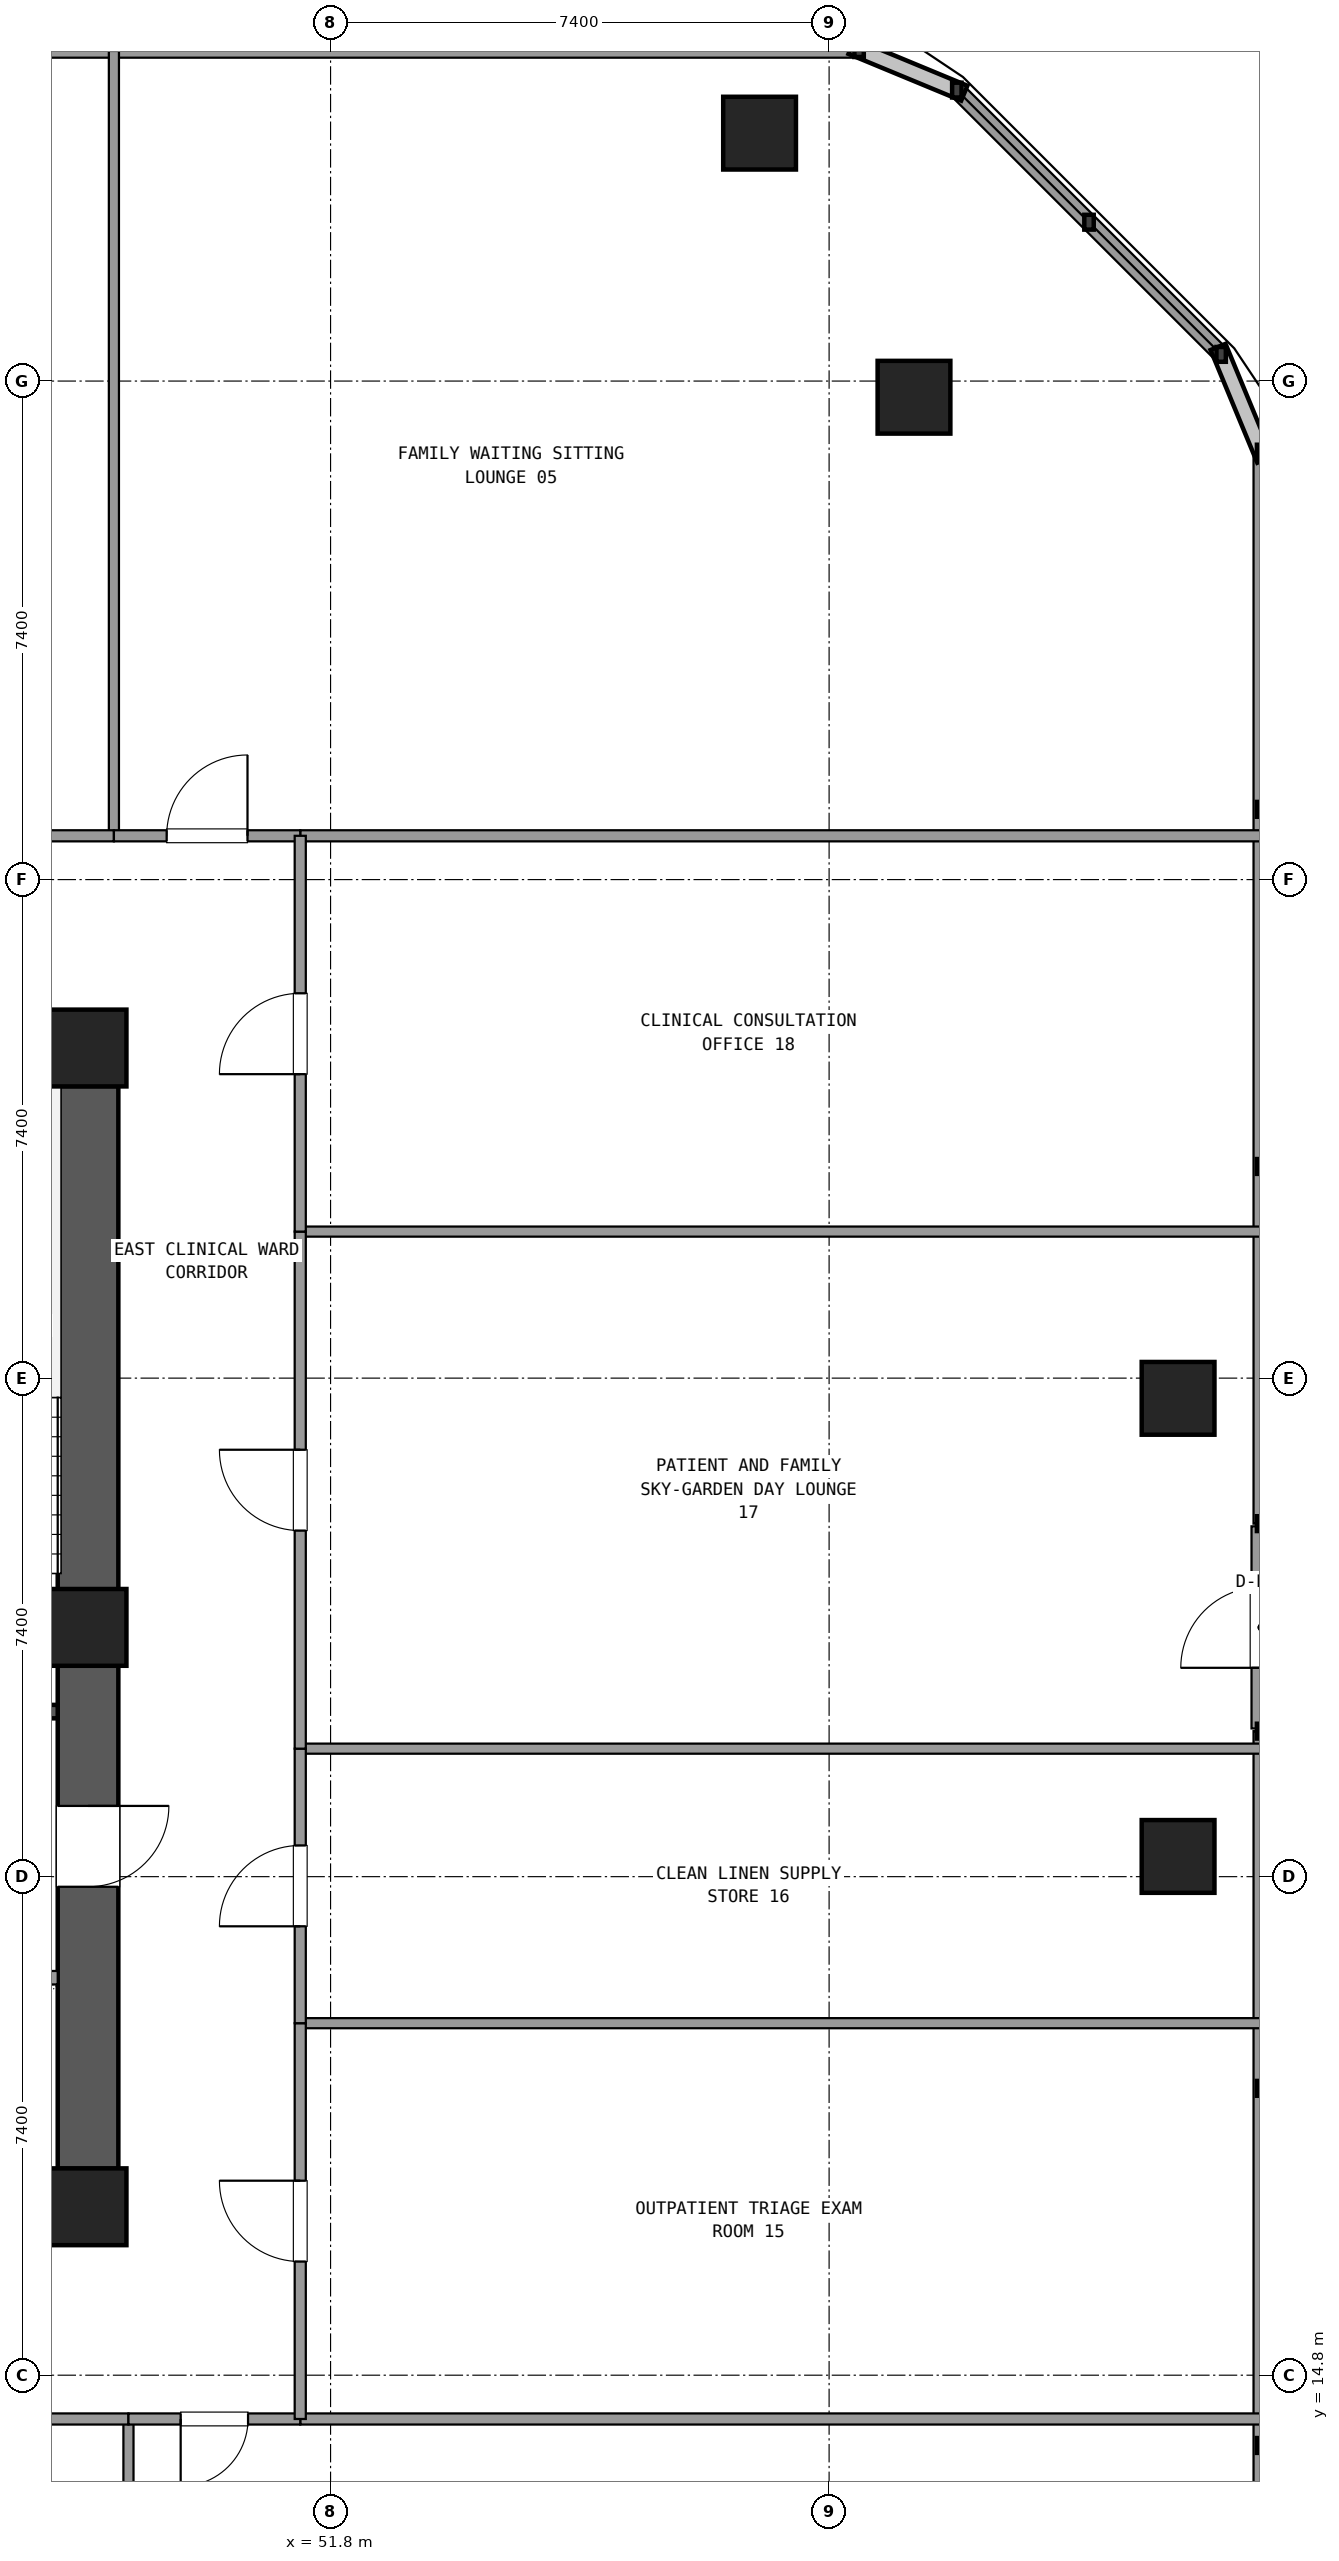
"""IFC4 building model, lengths in metres.
Left out: names, types, materials, properties, quantities, classifications, styles, units other than length and angle.
Written with IfcOpenShell. Run it as: python <this file> out.ifc"""

import sys

from ifc_helpers import new_model, si_unit, direction, frame, frame_2d, origin, origin_2d, place, context, subcontext, project, spatial, rectangle, extrude, element, fill, save


model = new_model("IFC4")
c1 = context("Model", 3, precision=1e-05, world=origin(), true_north=direction((0.0, 1.0)))
c2 = subcontext(c1, "Body", "Model", "MODEL_VIEW")
j1 = project(units=[si_unit("LENGTHUNIT", "METRE"), si_unit("PLANEANGLEUNIT", "RADIAN")], contexts=[c1])
p1 = place(None, origin())
s1 = spatial("IfcSite", under=j1, at=p1, CompositionType="ELEMENT")
p2 = place(p1, origin())
s2 = spatial("IfcBuilding", under=s1, at=p2, CompositionType="ELEMENT")
p3 = place(p2, frame((0.0, 0.0, 41.94)))
s3 = spatial("IfcBuildingStorey", under=s2, at=p3, CompositionType="ELEMENT", Elevation=41.94)
for number, where, z_axis, x_axis in (
    (1, (48.2, 17.3, 0.0), (0.0, 0.0, 1.0), (1.0, 0.0, 0.0)),
    (2, (48.2, 25.9, 0.0), (0.0, 0.0, 1.0), (1.0, 0.0, 0.0)),
    (3, (48.2, 34.5, 0.0), (0.0, 0.0, 1.0), (1.0, 0.0, 0.0)),
):
    element("IfcColumn", number, at=place(p3, frame(where, z_axis=z_axis, x_axis=x_axis)), inside=s3, PredefinedType="COLUMN", context=c2, shape_type="SweptSolid", body=[
        extrude(rectangle(XDim=1.14, YDim=1.14, at=origin_2d()), origin(), (0.0, 0.0, 1.0), 3.6),
    ])
p4 = place(p3, frame((48.2, 17.865, 0.0), z_axis=(0.0, 0.0, 1.0), x_axis=(0.0, 1.0, 0.0)))
e4 = element("IfcWall", 4, at=p4, inside=s3, PredefinedType="SHEAR", context=c2, shape_type="SweptSolid", body=[
    extrude(rectangle(XDim=7.47, YDim=0.9, at=frame_2d((3.735, 0.0))), origin(), (0.0, 0.0, 1.0), 3.32),
])
p5 = place(p4, frame((4.185, 0.0, 0.0)))
e5 = element("IfcOpeningElement", 5, at=p5, cuts=e4, PredefinedType="OPENING", context=c2, shape_type="SweptSolid", body=[
    extrude(rectangle(XDim=1.2, YDim=2.15, at=frame_2d((0.6, 1.075))), frame((0.0, 0.46, 0.0), z_axis=(0.0, -1.0, 0.0), x_axis=(1.0, 0.0, 0.0)), (0.0, 0.0, 1.0), 0.92),
])
p6 = place(p3, frame((48.2, 26.465, 0.0), z_axis=(0.0, 0.0, 1.0), x_axis=(0.0, 1.0, 0.0)))
e6 = element("IfcWall", 6, at=p6, inside=s3, PredefinedType="SHEAR", context=c2, shape_type="SweptSolid", body=[
    extrude(rectangle(XDim=7.47, YDim=0.9, at=frame_2d((3.735, 0.0))), origin(), (0.0, 0.0, 1.0), 3.32),
])
for number, where, z_axis, x_axis in (
    (7, (64.38, 22.5, 0.0), (0.0, 0.0, 1.0), (1.0, 0.0, 0.0)),
    (8, (64.38, 29.3, 0.0), (0.0, 0.0, 1.0), (1.0, 0.0, 0.0)),
    (9, (60.46, 44.16, 0.0), (0.0, 0.0, 1.0), (1.0, 0.0, 0.0)),
    (10, (58.168, 48.08, 0.0), (0.0, 0.0, 1.0), (1.0, 0.0, 0.0)),
):
    element("IfcColumn", number, at=place(p3, frame(where, z_axis=z_axis, x_axis=x_axis)), inside=s3, PredefinedType="COLUMN", context=c2, shape_type="SweptSolid", body=[
        extrude(rectangle(XDim=1.08, YDim=1.08, at=origin_2d()), origin(), (0.0, 0.0, 1.0), 3.6),
    ])
p7 = place(p3, frame((65.62, 24.4, 0.0), z_axis=(0.0, 0.0, 1.0), x_axis=(0.0, 1.0, 0.0)))
e11 = element("IfcWall", 11, at=p7, inside=s3, PredefinedType="SOLIDWALL", context=c2, shape_type="SweptSolid", body=[
    extrude(rectangle(XDim=3.0, YDim=0.3, at=frame_2d((1.5, 0.0))), origin(), (0.0, 0.0, 1.0), 2.65),
])
p8 = place(p7, frame((0.9, 0.0, 0.0)))
e12 = element("IfcOpeningElement", 12, at=p8, cuts=e11, PredefinedType="OPENING", context=c2, shape_type="SweptSolid", body=[
    extrude(rectangle(XDim=1.2, YDim=2.2, at=frame_2d((0.6, 1.1))), frame((0.0, 0.16, 0.0), z_axis=(0.0, -1.0, 0.0), x_axis=(1.0, 0.0, 0.0)), (0.0, 0.0, 1.0), 0.32),
])
for number, where, z_axis, x_axis in (
    (13, (65.62, 8.455, 0.0), (0.0, 0.0, 1.0), (0.0, 1.0, 0.0)),
    (14, (65.62, 27.44, 0.0), (0.0, 0.0, 1.0), (0.0, 1.0, 0.0)),
):
    element("IfcWall", number, at=place(p3, frame(where, z_axis=z_axis, x_axis=x_axis)), inside=s3, PredefinedType="SOLIDWALL", context=c2, shape_type="SweptSolid", body=[
        extrude(rectangle(XDim=15.905, YDim=0.24, at=frame_2d((7.953, 0.0))), origin(), (0.0, 0.0, 1.0), 0.85),
    ])
p9 = place(p3, frame((65.019, 44.796, 0.0), z_axis=(0.0, 0.0, 1.0), x_axis=(-0.707106781187, 0.707106781187, 0.0)))
e15 = element("IfcWall", 15, at=p9, inside=s3, PredefinedType="SOLIDWALL", context=c2, shape_type="SweptSolid", body=[
    extrude(rectangle(XDim=5.548, YDim=0.24, at=frame_2d((2.774, 0.0))), origin(), (0.0, 0.0, 1.0), 0.85),
])
p10 = place(p3, frame((59.645, 49.32, 0.0), z_axis=(0.0, 0.0, 1.0), x_axis=(-1.0, 0.0, 0.0)))
e16 = element("IfcWall", 16, at=p10, inside=s3, PredefinedType="SOLIDWALL", context=c2, shape_type="SweptSolid", body=[
    extrude(rectangle(XDim=45.29, YDim=0.24, at=frame_2d((22.645, 0.0))), origin(), (0.0, 0.0, 1.0), 0.85),
])
p11 = place(p3, frame((43.35, 24.65, 0.0), z_axis=(0.0, 0.0, 1.0), x_axis=(1.0, 0.0, 0.0)))
e17 = element("IfcWall", 17, at=p11, inside=s3, PredefinedType="SHEAR", context=c2, shape_type="SweptSolid", body=[
    extrude(rectangle(XDim=4.4, YDim=0.2, at=frame_2d((2.2, 0.0))), origin(), (0.0, 0.0, 1.0), 3.32),
])
p12 = place(p11, frame((2.0, 0.0, 0.0)))
e18 = element("IfcOpeningElement", 18, at=p12, cuts=e17, PredefinedType="OPENING", context=c2, shape_type="SweptSolid", body=[
    extrude(rectangle(XDim=1.2, YDim=2.15, at=frame_2d((0.6, 1.075))), frame((0.0, 0.11, 0.0), z_axis=(0.0, -1.0, 0.0), x_axis=(1.0, 0.0, 0.0)), (0.0, 0.0, 1.0), 0.22),
])
p13 = place(p3, frame((43.35, 20.7, 0.0), z_axis=(0.0, 0.0, 1.0), x_axis=(1.0, 0.0, 0.0)))
e19 = element("IfcWall", 19, at=p13, inside=s3, PredefinedType="SOLIDWALL", context=c2, shape_type="SweptSolid", body=[
    extrude(rectangle(XDim=4.4, YDim=0.2, at=frame_2d((2.2, 0.0))), origin(), (0.0, 0.0, 1.0), 2.61),
])
p14 = place(p13, frame((2.35, 0.0, 0.0)))
e20 = element("IfcOpeningElement", 20, at=p14, cuts=e19, PredefinedType="OPENING", context=c2, shape_type="SweptSolid", body=[
    extrude(rectangle(XDim=1.2, YDim=2.15, at=frame_2d((0.6, 1.075))), frame((0.0, 0.11, 0.0), z_axis=(0.0, -1.0, 0.0), x_axis=(1.0, 0.0, 0.0)), (0.0, 0.0, 1.0), 0.22),
])
for number, where, z_axis, x_axis in (
    (21, (51.35, 37.65, 0.0), (0.0, 0.0, 1.0), (1.0, 0.0, 0.0)),
    (22, (51.35, 14.15, 0.0), (0.0, 0.0, 1.0), (1.0, 0.0, 0.0)),
):
    element("IfcWall", number, at=place(p3, frame(where, z_axis=z_axis, x_axis=x_axis)), inside=s3, PredefinedType="PARTITIONING", context=c2, shape_type="SweptSolid", body=[
        extrude(rectangle(XDim=14.25, YDim=0.165, at=frame_2d((7.125, 0.0))), origin(), (0.0, 0.0, 1.0), 2.61),
    ])
p15 = place(p3, frame((48.584, 37.65, 0.0), z_axis=(0.0, 0.0, 1.0), x_axis=(0.0, 1.0, 0.0)))
e23 = element("IfcWall", 23, at=p15, inside=s3, PredefinedType="PARTITIONING", context=c2, shape_type="SweptSolid", body=[
    extrude(rectangle(XDim=11.65, YDim=0.15, at=frame_2d((5.825, 0.0))), origin(), (0.0, 0.0, 1.0), 2.61),
])
p16 = place(p3, frame((41.099, 37.65, 0.0), z_axis=(0.0, 0.0, 1.0), x_axis=(1.0, 0.0, 0.0)))
e24 = element("IfcWall", 24, at=p16, inside=s3, PredefinedType="PARTITIONING", context=c2, shape_type="SweptSolid", body=[
    extrude(rectangle(XDim=7.485, YDim=0.165, at=frame_2d((3.742, 0.0))), origin(), (0.0, 0.0, 1.0), 2.61),
])
p17 = place(p16, frame((3.143, 0.0, 0.0)))
e25 = element("IfcOpeningElement", 25, at=p17, cuts=e24, PredefinedType="OPENING", context=c2, shape_type="SweptSolid", body=[
    extrude(rectangle(XDim=1.2, YDim=2.15, at=frame_2d((0.6, 1.075))), frame((0.0, 0.093, 0.0), z_axis=(0.0, -1.0, 0.0), x_axis=(1.0, 0.0, 0.0)), (0.0, 0.0, 1.0), 0.185),
])
p18 = place(p3, frame((48.584, 37.65, 0.0), z_axis=(0.0, 0.0, 1.0), x_axis=(1.0, 0.0, 0.0)))
e26 = element("IfcWall", 26, at=p18, inside=s3, PredefinedType="PARTITIONING", context=c2, shape_type="SweptSolid", body=[
    extrude(rectangle(XDim=2.766, YDim=0.165, at=frame_2d((1.383, 0.0))), origin(), (0.0, 0.0, 1.0), 2.61),
])
p19 = place(p18, frame((0.783, 0.0, 0.0)))
e27 = element("IfcOpeningElement", 27, at=p19, cuts=e26, PredefinedType="OPENING", context=c2, shape_type="SweptSolid", body=[
    extrude(rectangle(XDim=1.2, YDim=2.15, at=frame_2d((0.6, 1.075))), frame((0.0, 0.093, 0.0), z_axis=(0.0, -1.0, 0.0), x_axis=(1.0, 0.0, 0.0)), (0.0, 0.0, 1.0), 0.185),
])
p20 = place(p3, frame((48.8, 14.15, 0.0), z_axis=(0.0, 0.0, 1.0), x_axis=(0.0, -1.0, 0.0)))
e28 = element("IfcWall", 28, at=p20, inside=s3, PredefinedType="PARTITIONING", context=c2, shape_type="SweptSolid", body=[
    extrude(rectangle(XDim=11.65, YDim=0.15, at=frame_2d((5.825, 0.0))), origin(), (0.0, 0.0, 1.0), 2.61),
])
p21 = place(p3, frame((41.964, 14.15, 0.0), z_axis=(0.0, 0.0, 1.0), x_axis=(1.0, 0.0, 0.0)))
e29 = element("IfcWall", 29, at=p21, inside=s3, PredefinedType="PARTITIONING", context=c2, shape_type="SweptSolid", body=[
    extrude(rectangle(XDim=6.836, YDim=0.165, at=frame_2d((3.418, 0.0))), origin(), (0.0, 0.0, 1.0), 2.61),
])
p22 = place(p21, frame((2.818, 0.0, 0.0)))
e30 = element("IfcOpeningElement", 30, at=p22, cuts=e29, PredefinedType="OPENING", context=c2, shape_type="SweptSolid", body=[
    extrude(rectangle(XDim=1.2, YDim=2.15, at=frame_2d((0.6, 1.075))), frame((0.0, 0.093, 0.0), z_axis=(0.0, -1.0, 0.0), x_axis=(1.0, 0.0, 0.0)), (0.0, 0.0, 1.0), 0.185),
])
p23 = place(p3, frame((48.8, 14.15, 0.0), z_axis=(0.0, 0.0, 1.0), x_axis=(1.0, 0.0, 0.0)))
e31 = element("IfcWall", 31, at=p23, inside=s3, PredefinedType="PARTITIONING", context=c2, shape_type="SweptSolid", body=[
    extrude(rectangle(XDim=2.55, YDim=0.165, at=frame_2d((1.275, 0.0))), origin(), (0.0, 0.0, 1.0), 2.61),
])
p24 = place(p23, frame((0.775, 0.0, 0.0)))
e32 = element("IfcOpeningElement", 32, at=p24, cuts=e31, PredefinedType="OPENING", context=c2, shape_type="SweptSolid", body=[
    extrude(rectangle(XDim=1.0, YDim=2.15, at=frame_2d((0.5, 1.075))), frame((0.0, 0.093, 0.0), z_axis=(0.0, -1.0, 0.0), x_axis=(1.0, 0.0, 0.0)), (0.0, 0.0, 1.0), 0.185),
])
p25 = place(p3, frame((51.35, 20.025, 0.0), z_axis=(0.0, 0.0, 1.0), x_axis=(1.0, 0.0, 0.0)))
e33 = element("IfcWall", 33, at=p25, inside=s3, PredefinedType="PARTITIONING", context=c2, shape_type="SweptSolid", body=[
    extrude(rectangle(XDim=14.25, YDim=0.15, at=frame_2d((7.125, 0.0))), origin(), (0.0, 0.0, 1.0), 2.61),
])
p26 = place(p3, frame((51.35, 14.15, 0.0), z_axis=(0.0, 0.0, 1.0), x_axis=(0.0, 1.0, 0.0)))
e34 = element("IfcWall", 34, at=p26, inside=s3, PredefinedType="PARTITIONING", context=c2, shape_type="SweptSolid", body=[
    extrude(rectangle(XDim=5.875, YDim=0.165, at=frame_2d((2.938, 0.0))), origin(), (0.0, 0.0, 1.0), 2.61),
])
p27 = place(p26, frame((2.337, 0.0, 0.0)))
e35 = element("IfcOpeningElement", 35, at=p27, cuts=e34, PredefinedType="OPENING", context=c2, shape_type="SweptSolid", body=[
    extrude(rectangle(XDim=1.2, YDim=2.15, at=frame_2d((0.6, 1.075))), frame((0.0, 0.093, 0.0), z_axis=(0.0, -1.0, 0.0), x_axis=(1.0, 0.0, 0.0)), (0.0, 0.0, 1.0), 0.185),
])
p28 = place(p3, frame((51.35, 24.1, 0.0), z_axis=(0.0, 0.0, 1.0), x_axis=(1.0, 0.0, 0.0)))
e36 = element("IfcWall", 36, at=p28, inside=s3, PredefinedType="PARTITIONING", context=c2, shape_type="SweptSolid", body=[
    extrude(rectangle(XDim=14.25, YDim=0.15, at=frame_2d((7.125, 0.0))), origin(), (0.0, 0.0, 1.0), 2.61),
])
p29 = place(p3, frame((51.35, 20.025, 0.0), z_axis=(0.0, 0.0, 1.0), x_axis=(0.0, 1.0, 0.0)))
e37 = element("IfcWall", 37, at=p29, inside=s3, PredefinedType="PARTITIONING", context=c2, shape_type="SweptSolid", body=[
    extrude(rectangle(XDim=4.075, YDim=0.165, at=frame_2d((2.038, 0.0))), origin(), (0.0, 0.0, 1.0), 2.61),
])
p30 = place(p29, frame((1.438, 0.0, 0.0)))
e38 = element("IfcOpeningElement", 38, at=p30, cuts=e37, PredefinedType="OPENING", context=c2, shape_type="SweptSolid", body=[
    extrude(rectangle(XDim=1.2, YDim=2.15, at=frame_2d((0.6, 1.075))), frame((0.0, 0.093, 0.0), z_axis=(0.0, -1.0, 0.0), x_axis=(1.0, 0.0, 0.0)), (0.0, 0.0, 1.0), 0.185),
])
p31 = place(p3, frame((51.35, 31.775, 0.0), z_axis=(0.0, 0.0, 1.0), x_axis=(1.0, 0.0, 0.0)))
e39 = element("IfcWall", 39, at=p31, inside=s3, PredefinedType="PARTITIONING", context=c2, shape_type="SweptSolid", body=[
    extrude(rectangle(XDim=14.25, YDim=0.15, at=frame_2d((7.125, 0.0))), origin(), (0.0, 0.0, 1.0), 2.61),
])
p32 = place(p3, frame((51.35, 24.1, 0.0), z_axis=(0.0, 0.0, 1.0), x_axis=(0.0, 1.0, 0.0)))
e40 = element("IfcWall", 40, at=p32, inside=s3, PredefinedType="PARTITIONING", context=c2, shape_type="SweptSolid", body=[
    extrude(rectangle(XDim=7.675, YDim=0.165, at=frame_2d((3.837, 0.0))), origin(), (0.0, 0.0, 1.0), 2.61),
])
p33 = place(p32, frame((3.237, 0.0, 0.0)))
e41 = element("IfcOpeningElement", 41, at=p33, cuts=e40, PredefinedType="OPENING", context=c2, shape_type="SweptSolid", body=[
    extrude(rectangle(XDim=1.2, YDim=2.15, at=frame_2d((0.6, 1.075))), frame((0.0, 0.093, 0.0), z_axis=(0.0, -1.0, 0.0), x_axis=(1.0, 0.0, 0.0)), (0.0, 0.0, 1.0), 0.185),
])
p34 = place(p3, frame((51.35, 31.775, 0.0), z_axis=(0.0, 0.0, 1.0), x_axis=(0.0, 1.0, 0.0)))
e42 = element("IfcWall", 42, at=p34, inside=s3, PredefinedType="PARTITIONING", context=c2, shape_type="SweptSolid", body=[
    extrude(rectangle(XDim=5.875, YDim=0.165, at=frame_2d((2.938, 0.0))), origin(), (0.0, 0.0, 1.0), 2.61),
])
p35 = place(p34, frame((2.337, 0.0, 0.0)))
e43 = element("IfcOpeningElement", 43, at=p35, cuts=e42, PredefinedType="OPENING", context=c2, shape_type="SweptSolid", body=[
    extrude(rectangle(XDim=1.2, YDim=2.15, at=frame_2d((0.6, 1.075))), frame((0.0, 0.093, 0.0), z_axis=(0.0, -1.0, 0.0), x_axis=(1.0, 0.0, 0.0)), (0.0, 0.0, 1.0), 0.185),
])
p36 = place(p5, frame((1.2, 0.0, 0.0), z_axis=(0.0, 0.0, 1.0), x_axis=(-1.0, 0.0, 0.0)))
e44 = element("IfcDoor", 44, at=p36, inside=s3, OperationType="SINGLE_SWING_RIGHT", PredefinedType="DOOR", context=c2, shape_type="SweptSolid", body=[
    extrude(rectangle(XDim=1.2, YDim=2.15, at=frame_2d((0.6, 1.075))), frame((0.0, 0.025, 0.0), z_axis=(0.0, -1.0, 0.0), x_axis=(1.0, 0.0, 0.0)), (0.0, 0.0, 1.0), 0.05),
])
fill(e5, e44)
p37 = place(p19, origin())
e45 = element("IfcDoor", 45, at=p37, inside=s3, OperationType="SINGLE_SWING_RIGHT", PredefinedType="DOOR", context=c2, shape_type="SweptSolid", body=[
    extrude(rectangle(XDim=1.2, YDim=2.15, at=frame_2d((0.6, 1.075))), frame((0.0, 0.025, 0.0), z_axis=(0.0, -1.0, 0.0), x_axis=(1.0, 0.0, 0.0)), (0.0, 0.0, 1.0), 0.05),
])
fill(e27, e45)
p38 = place(p24, frame((1.0, 0.0, 0.0), z_axis=(0.0, 0.0, 1.0), x_axis=(-1.0, 0.0, 0.0)))
e46 = element("IfcDoor", 46, at=p38, inside=s3, OperationType="SINGLE_SWING_LEFT", PredefinedType="DOOR", context=c2, shape_type="SweptSolid", body=[
    extrude(rectangle(XDim=1.0, YDim=2.15, at=frame_2d((0.5, 1.075))), frame((0.0, 0.025, 0.0), z_axis=(0.0, -1.0, 0.0), x_axis=(1.0, 0.0, 0.0)), (0.0, 0.0, 1.0), 0.05),
])
fill(e32, e46)
p39 = place(p27, origin())
e47 = element("IfcDoor", 47, at=p39, inside=s3, OperationType="SINGLE_SWING_RIGHT", PredefinedType="DOOR", context=c2, shape_type="SweptSolid", body=[
    extrude(rectangle(XDim=1.2, YDim=2.15, at=frame_2d((0.6, 1.075))), frame((0.0, 0.025, 0.0), z_axis=(0.0, -1.0, 0.0), x_axis=(1.0, 0.0, 0.0)), (0.0, 0.0, 1.0), 0.05),
])
fill(e35, e47)
p40 = place(p30, origin())
e48 = element("IfcDoor", 48, at=p40, inside=s3, OperationType="SINGLE_SWING_LEFT", PredefinedType="DOOR", context=c2, shape_type="SweptSolid", body=[
    extrude(rectangle(XDim=1.2, YDim=2.15, at=frame_2d((0.6, 1.075))), frame((0.0, 0.025, 0.0), z_axis=(0.0, -1.0, 0.0), x_axis=(1.0, 0.0, 0.0)), (0.0, 0.0, 1.0), 0.05),
])
fill(e38, e48)
p41 = place(p33, origin())
e49 = element("IfcDoor", 49, at=p41, inside=s3, OperationType="SINGLE_SWING_RIGHT", PredefinedType="DOOR", context=c2, shape_type="SweptSolid", body=[
    extrude(rectangle(XDim=1.2, YDim=2.15, at=frame_2d((0.6, 1.075))), frame((0.0, 0.025, 0.0), z_axis=(0.0, -1.0, 0.0), x_axis=(1.0, 0.0, 0.0)), (0.0, 0.0, 1.0), 0.05),
])
fill(e41, e49)
p42 = place(p35, origin())
e50 = element("IfcDoor", 50, at=p42, inside=s3, OperationType="SINGLE_SWING_LEFT", PredefinedType="DOOR", context=c2, shape_type="SweptSolid", body=[
    extrude(rectangle(XDim=1.2, YDim=2.15, at=frame_2d((0.6, 1.075))), frame((0.0, 0.025, 0.0), z_axis=(0.0, -1.0, 0.0), x_axis=(1.0, 0.0, 0.0)), (0.0, 0.0, 1.0), 0.05),
])
fill(e43, e50)
save(model, sys.argv[1])
